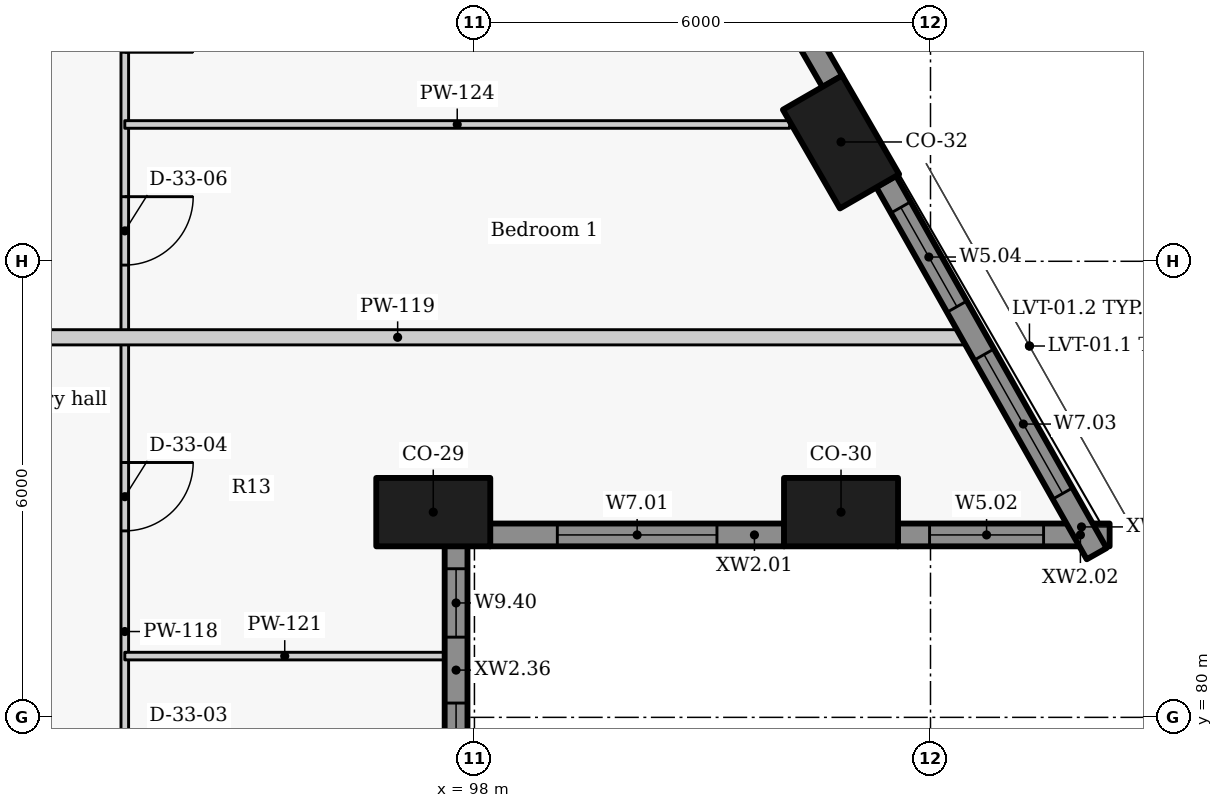
"""IFC4 building model, lengths in metres.
Left out: names, types, materials, properties, quantities, classifications, styles, units other than length and angle.
Written with IfcOpenShell. Run it as: python <this file> out.ifc"""

import sys

from ifc_helpers import new_model, si_unit, direction, frame, frame_2d, origin, origin_2d, place, context, subcontext, project, spatial, rectangle, extrude, element, fill, save


model = new_model("IFC4")
c1 = context("Model", 3, precision=1e-05, world=origin(), true_north=direction((0.0, 1.0)))
c2 = subcontext(c1, "Body", "Model", "MODEL_VIEW")
j1 = project(units=[si_unit("LENGTHUNIT", "METRE"), si_unit("PLANEANGLEUNIT", "RADIAN")], contexts=[c1])
p1 = place(None, origin())
s1 = spatial("IfcSite", under=j1, at=p1, CompositionType="ELEMENT")
p2 = place(p1, origin())
s2 = spatial("IfcBuilding", under=s1, at=p2, CompositionType="ELEMENT")
p3 = place(p2, frame((0.0, 0.0, 61.2)))
s3 = spatial("IfcBuildingStorey", under=s2, at=p3, CompositionType="ELEMENT", Elevation=61.2)
for number, where, z_axis, x_axis in (
    (1, (97.458, 82.7, 0.0), (0.0, 0.0, 1.0), (1.0, 0.0, 0.0)),
    (2, (102.823, 82.7, 0.0), (0.0, 0.0, 1.0), (1.0, 0.0, 0.0)),
    (3, (102.823, 87.57, 0.0), (0.0, 0.0, 1.0), (-0.5, 0.866, 0.0)),
):
    element("IfcColumn", number, at=place(p3, frame(where, z_axis=z_axis, x_axis=x_axis)), inside=s3, PredefinedType="COLUMN", context=c2, shape_type="SweptSolid", body=[
        extrude(rectangle(XDim=1.5, YDim=0.9, at=origin_2d()), origin(), (0.0, 0.0, 1.0), 3.3),
    ])
p4 = place(p3, frame((98.204, 82.4, 0.0), z_axis=(0.0, 0.0, 1.0), x_axis=(1.0, 0.0, 0.0)))
e4 = element("IfcWall", 4, at=p4, inside=s3, PredefinedType="SOLIDWALL", context=c2, shape_type="SweptSolid", body=[
    extrude(rectangle(XDim=3.873, YDim=0.3, at=frame_2d((1.936, 0.0))), origin(), (0.0, 0.0, 1.0), 2.425),
])
p5 = place(p4, frame((0.886, 0.0, 0.9)))
e5 = element("IfcOpeningElement", 5, at=p5, cuts=e4, PredefinedType="OPENING", context=c2, shape_type="SweptSolid", body=[
    extrude(rectangle(XDim=2.1, YDim=1.1, at=frame_2d((1.05, 0.55))), frame((0.0, 0.16, 0.0), z_axis=(0.0, -1.0, 0.0), x_axis=(1.0, 0.0, 0.0)), (0.0, 0.0, 1.0), 0.32),
])
p6 = place(p3, frame((103.569, 82.4, 0.0), z_axis=(0.0, 0.0, 1.0), x_axis=(1.0, 0.0, 0.0)))
e6 = element("IfcWall", 6, at=p6, inside=s3, PredefinedType="SOLIDWALL", context=c2, shape_type="SweptSolid", body=[
    extrude(rectangle(XDim=2.788, YDim=0.3, at=frame_2d((1.394, 0.0))), origin(), (0.0, 0.0, 1.0), 2.425),
])
p7 = place(p6, frame((0.419, 0.0, 0.9)))
e7 = element("IfcOpeningElement", 7, at=p7, cuts=e6, PredefinedType="OPENING", context=c2, shape_type="SweptSolid", body=[
    extrude(rectangle(XDim=1.5, YDim=1.1, at=frame_2d((0.75, 0.55))), frame((0.0, 0.16, 0.0), z_axis=(0.0, -1.0, 0.0), x_axis=(1.0, 0.0, 0.0)), (0.0, 0.0, 1.0), 0.32),
])
p8 = place(p3, frame((106.186, 82.153, 0.0), z_axis=(0.0, 0.0, 1.0), x_axis=(-0.492363204642, 0.870389840655, 0.0)))
e8 = element("IfcWall", 8, at=p8, inside=s3, PredefinedType="SOLIDWALL", context=c2, shape_type="SweptSolid", body=[
    extrude(rectangle(XDim=5.626, YDim=0.3, at=frame_2d((2.813, 0.0))), origin(), (0.0, 0.0, 1.0), 2.425),
])
p9 = place(p8, frame((0.909, 0.0, 0.9)))
e9 = element("IfcOpeningElement", 9, at=p9, cuts=e8, PredefinedType="OPENING", context=c2, shape_type="SweptSolid", body=[
    extrude(rectangle(XDim=2.1, YDim=1.1, at=frame_2d((1.05, 0.55))), frame((0.0, 0.16, 0.0), z_axis=(0.0, -1.0, 0.0), x_axis=(1.0, 0.0, 0.0)), (0.0, 0.0, 1.0), 0.32),
])
p10 = place(p8, frame((3.734, 0.0, 0.9)))
e10 = element("IfcOpeningElement", 10, at=p10, cuts=e8, PredefinedType="OPENING", context=c2, shape_type="SweptSolid", body=[
    extrude(rectangle(XDim=1.5, YDim=1.1, at=frame_2d((0.75, 0.55))), frame((0.0, 0.16, 0.0), z_axis=(0.0, -1.0, 0.0), x_axis=(1.0, 0.0, 0.0)), (0.0, 0.0, 1.0), 0.32),
])
p11 = place(p3, frame((102.71, 88.366, 0.0), z_axis=(0.0, 0.0, 1.0), x_axis=(-0.499977402622, 0.866038449993, 0.0)))
e11 = element("IfcWall", 11, at=p11, inside=s3, PredefinedType="SOLIDWALL", context=c2, shape_type="SweptSolid", body=[
    extrude(rectangle(XDim=3.537, YDim=0.3, at=frame_2d((1.769, 0.0))), origin(), (0.0, 0.0, 1.0), 2.425),
])
p12 = place(p11, frame((0.601, 0.0, 0.9)))
e12 = element("IfcOpeningElement", 12, at=p12, cuts=e11, PredefinedType="OPENING", context=c2, shape_type="SweptSolid", body=[
    extrude(rectangle(XDim=1.5, YDim=1.1, at=frame_2d((0.75, 0.55))), frame((0.0, 0.16, 0.0), z_axis=(0.0, -1.0, 0.0), x_axis=(1.0, 0.0, 0.0)), (0.0, 0.0, 1.0), 0.32),
])
p13 = place(p3, frame((97.758, 78.046, 0.0), z_axis=(0.0, 0.0, 1.0), x_axis=(0.0, 1.0, 0.0)))
e13 = element("IfcWall", 13, at=p13, inside=s3, PredefinedType="SOLIDWALL", context=c2, shape_type="SweptSolid", body=[
    extrude(rectangle(XDim=4.208, YDim=0.3, at=frame_2d((2.104, 0.0))), origin(), (0.0, 0.0, 1.0), 2.425),
])
p14 = place(p13, frame((0.642, 0.0, 0.9)))
e14 = element("IfcOpeningElement", 14, at=p14, cuts=e13, PredefinedType="OPENING", context=c2, shape_type="SweptSolid", body=[
    extrude(rectangle(XDim=1.5, YDim=1.1, at=frame_2d((0.75, 0.55))), frame((0.0, 0.16, 0.0), z_axis=(0.0, -1.0, 0.0), x_axis=(1.0, 0.0, 0.0)), (0.0, 0.0, 1.0), 0.32),
])
p15 = place(p13, frame((3.009, 0.0, 0.9)))
e15 = element("IfcOpeningElement", 15, at=p15, cuts=e13, PredefinedType="OPENING", context=c2, shape_type="SweptSolid", body=[
    extrude(rectangle(XDim=0.9, YDim=1.1, at=frame_2d((0.45, 0.55))), frame((0.0, 0.16, 0.0), z_axis=(0.0, -1.0, 0.0), x_axis=(1.0, 0.0, 0.0)), (0.0, 0.0, 1.0), 0.32),
])
p16 = place(p3, frame((93.4, 94.25, 0.0), z_axis=(0.0, 0.0, 1.0), x_axis=(0.0, -1.0, 0.0)))
e16 = element("IfcWall", 16, at=p16, inside=s3, PredefinedType="PARTITIONING", context=c2, shape_type="SweptSolid", body=[
    extrude(rectangle(XDim=19.25, YDim=0.1, at=frame_2d((9.625, 0.0))), origin(), (0.0, 0.0, 1.0), 3.025),
])
p17 = place(p16, frame((17.348, 0.0, 0.0)))
e17 = element("IfcOpeningElement", 17, at=p17, cuts=e16, PredefinedType="OPENING", context=c2, shape_type="SweptSolid", body=[
    extrude(rectangle(XDim=0.9, YDim=2.1, at=frame_2d((0.45, 1.05))), frame((0.0, 0.06, 0.0), z_axis=(0.0, -1.0, 0.0), x_axis=(1.0, 0.0, 0.0)), (0.0, 0.0, 1.0), 0.12),
])
p18 = place(p16, frame((14.445, 0.0, 0.0)))
e18 = element("IfcOpeningElement", 18, at=p18, cuts=e16, PredefinedType="OPENING", context=c2, shape_type="SweptSolid", body=[
    extrude(rectangle(XDim=0.9, YDim=2.1, at=frame_2d((0.45, 1.05))), frame((0.0, 0.06, 0.0), z_axis=(0.0, -1.0, 0.0), x_axis=(1.0, 0.0, 0.0)), (0.0, 0.0, 1.0), 0.12),
])
p19 = place(p16, frame((10.897, 0.0, 0.0)))
e19 = element("IfcOpeningElement", 19, at=p19, cuts=e16, PredefinedType="OPENING", context=c2, shape_type="SweptSolid", body=[
    extrude(rectangle(XDim=0.9, YDim=2.1, at=frame_2d((0.45, 1.05))), frame((0.0, 0.06, 0.0), z_axis=(0.0, -1.0, 0.0), x_axis=(1.0, 0.0, 0.0)), (0.0, 0.0, 1.0), 0.12),
])
p20 = place(p16, frame((7.4, 0.0, 0.0)))
e20 = element("IfcOpeningElement", 20, at=p20, cuts=e16, PredefinedType="OPENING", context=c2, shape_type="SweptSolid", body=[
    extrude(rectangle(XDim=0.9, YDim=2.1, at=frame_2d((0.45, 1.05))), frame((0.0, 0.06, 0.0), z_axis=(0.0, -1.0, 0.0), x_axis=(1.0, 0.0, 0.0)), (0.0, 0.0, 1.0), 0.12),
])
p21 = place(p16, frame((4.6, 0.0, 0.0)))
e21 = element("IfcOpeningElement", 21, at=p21, cuts=e16, PredefinedType="OPENING", context=c2, shape_type="SweptSolid", body=[
    extrude(rectangle(XDim=0.9, YDim=2.1, at=frame_2d((0.45, 1.05))), frame((0.0, 0.06, 0.0), z_axis=(0.0, -1.0, 0.0), x_axis=(1.0, 0.0, 0.0)), (0.0, 0.0, 1.0), 0.12),
])
p22 = place(p16, frame((1.375, 0.0, 0.0)))
e22 = element("IfcOpeningElement", 22, at=p22, cuts=e16, PredefinedType="OPENING", context=c2, shape_type="SweptSolid", body=[
    extrude(rectangle(XDim=0.9, YDim=2.1, at=frame_2d((0.45, 1.05))), frame((0.0, 0.06, 0.0), z_axis=(0.0, -1.0, 0.0), x_axis=(1.0, 0.0, 0.0)), (0.0, 0.0, 1.0), 0.12),
])
p23 = place(p3, frame((89.5, 85.0, 0.0), z_axis=(0.0, 0.0, 1.0), x_axis=(1.0, 0.0, 0.0)))
e23 = element("IfcWall", 23, at=p23, inside=s3, PredefinedType="PARTITIONING", context=c2, shape_type="SweptSolid", body=[
    extrude(rectangle(XDim=14.979, YDim=0.2, at=frame_2d((7.49, 0.0))), origin(), (0.0, 0.0, 1.0), 2.405),
])
p24 = place(p3, frame((93.4, 80.806, 0.0), z_axis=(0.0, 0.0, 1.0), x_axis=(1.0, 0.0, 0.0)))
e24 = element("IfcWall", 24, at=p24, inside=s3, PredefinedType="PARTITIONING", context=c2, shape_type="SweptSolid", body=[
    extrude(rectangle(XDim=4.208, YDim=0.1, at=frame_2d((2.104, 0.0))), origin(), (0.0, 0.0, 1.0), 2.405),
])
p25 = place(p3, frame((93.4, 87.8, 0.0), z_axis=(0.0, 0.0, 1.0), x_axis=(1.0, 0.0, 0.0)))
e25 = element("IfcWall", 25, at=p25, inside=s3, PredefinedType="PARTITIONING", context=c2, shape_type="SweptSolid", body=[
    extrude(rectangle(XDim=8.747, YDim=0.1, at=frame_2d((4.374, 0.0))), origin(), (0.0, 0.0, 1.0), 3.025),
])
p26 = place(p5, origin())
e26 = element("IfcWindow", 26, at=p26, inside=s3, PartitioningType="SINGLE_PANEL", PredefinedType="WINDOW", context=c2, shape_type="SweptSolid", body=[
    extrude(rectangle(XDim=2.1, YDim=1.1, at=frame_2d((1.05, 0.55))), frame((0.0, 0.03, 0.0), z_axis=(0.0, -1.0, 0.0), x_axis=(1.0, 0.0, 0.0)), (0.0, 0.0, 1.0), 0.06),
])
fill(e5, e26)
p27 = place(p7, origin())
e27 = element("IfcWindow", 27, at=p27, inside=s3, PartitioningType="SINGLE_PANEL", PredefinedType="WINDOW", context=c2, shape_type="SweptSolid", body=[
    extrude(rectangle(XDim=1.5, YDim=1.1, at=frame_2d((0.75, 0.55))), frame((0.0, 0.03, 0.0), z_axis=(0.0, -1.0, 0.0), x_axis=(1.0, 0.0, 0.0)), (0.0, 0.0, 1.0), 0.06),
])
fill(e7, e27)
p28 = place(p9, origin())
e28 = element("IfcWindow", 28, at=p28, inside=s3, PartitioningType="SINGLE_PANEL", PredefinedType="WINDOW", context=c2, shape_type="SweptSolid", body=[
    extrude(rectangle(XDim=2.1, YDim=1.1, at=frame_2d((1.05, 0.55))), frame((0.0, 0.03, 0.0), z_axis=(0.0, -1.0, 0.0), x_axis=(1.0, 0.0, 0.0)), (0.0, 0.0, 1.0), 0.06),
])
fill(e9, e28)
p29 = place(p10, origin())
e29 = element("IfcWindow", 29, at=p29, inside=s3, PartitioningType="SINGLE_PANEL", PredefinedType="WINDOW", context=c2, shape_type="SweptSolid", body=[
    extrude(rectangle(XDim=1.5, YDim=1.1, at=frame_2d((0.75, 0.55))), frame((0.0, 0.03, 0.0), z_axis=(0.0, -1.0, 0.0), x_axis=(1.0, 0.0, 0.0)), (0.0, 0.0, 1.0), 0.06),
])
fill(e10, e29)
p30 = place(p14, origin())
e30 = element("IfcWindow", 30, at=p30, inside=s3, PartitioningType="SINGLE_PANEL", PredefinedType="WINDOW", context=c2, shape_type="SweptSolid", body=[
    extrude(rectangle(XDim=1.5, YDim=1.1, at=frame_2d((0.75, 0.55))), frame((0.0, 0.03, 0.0), z_axis=(0.0, -1.0, 0.0), x_axis=(1.0, 0.0, 0.0)), (0.0, 0.0, 1.0), 0.06),
])
fill(e14, e30)
p31 = place(p15, origin())
e31 = element("IfcWindow", 31, at=p31, inside=s3, PartitioningType="SINGLE_PANEL", PredefinedType="WINDOW", context=c2, shape_type="SweptSolid", body=[
    extrude(rectangle(XDim=0.9, YDim=1.1, at=frame_2d((0.45, 0.55))), frame((0.0, 0.03, 0.0), z_axis=(0.0, -1.0, 0.0), x_axis=(1.0, 0.0, 0.0)), (0.0, 0.0, 1.0), 0.06),
])
fill(e15, e31)
p32 = place(p19, origin())
e32 = element("IfcDoor", 32, at=p32, inside=s3, OperationType="SINGLE_SWING_LEFT", PredefinedType="DOOR", context=c2, shape_type="SweptSolid", body=[
    extrude(rectangle(XDim=0.9, YDim=2.1, at=frame_2d((0.45, 1.05))), frame((0.0, 0.025, 0.0), z_axis=(0.0, -1.0, 0.0), x_axis=(1.0, 0.0, 0.0)), (0.0, 0.0, 1.0), 0.05),
])
fill(e19, e32)
p33 = place(p20, origin())
e33 = element("IfcDoor", 33, at=p33, inside=s3, OperationType="SINGLE_SWING_LEFT", PredefinedType="DOOR", context=c2, shape_type="SweptSolid", body=[
    extrude(rectangle(XDim=0.9, YDim=2.1, at=frame_2d((0.45, 1.05))), frame((0.0, 0.025, 0.0), z_axis=(0.0, -1.0, 0.0), x_axis=(1.0, 0.0, 0.0)), (0.0, 0.0, 1.0), 0.05),
])
fill(e20, e33)
save(model, sys.argv[1])
